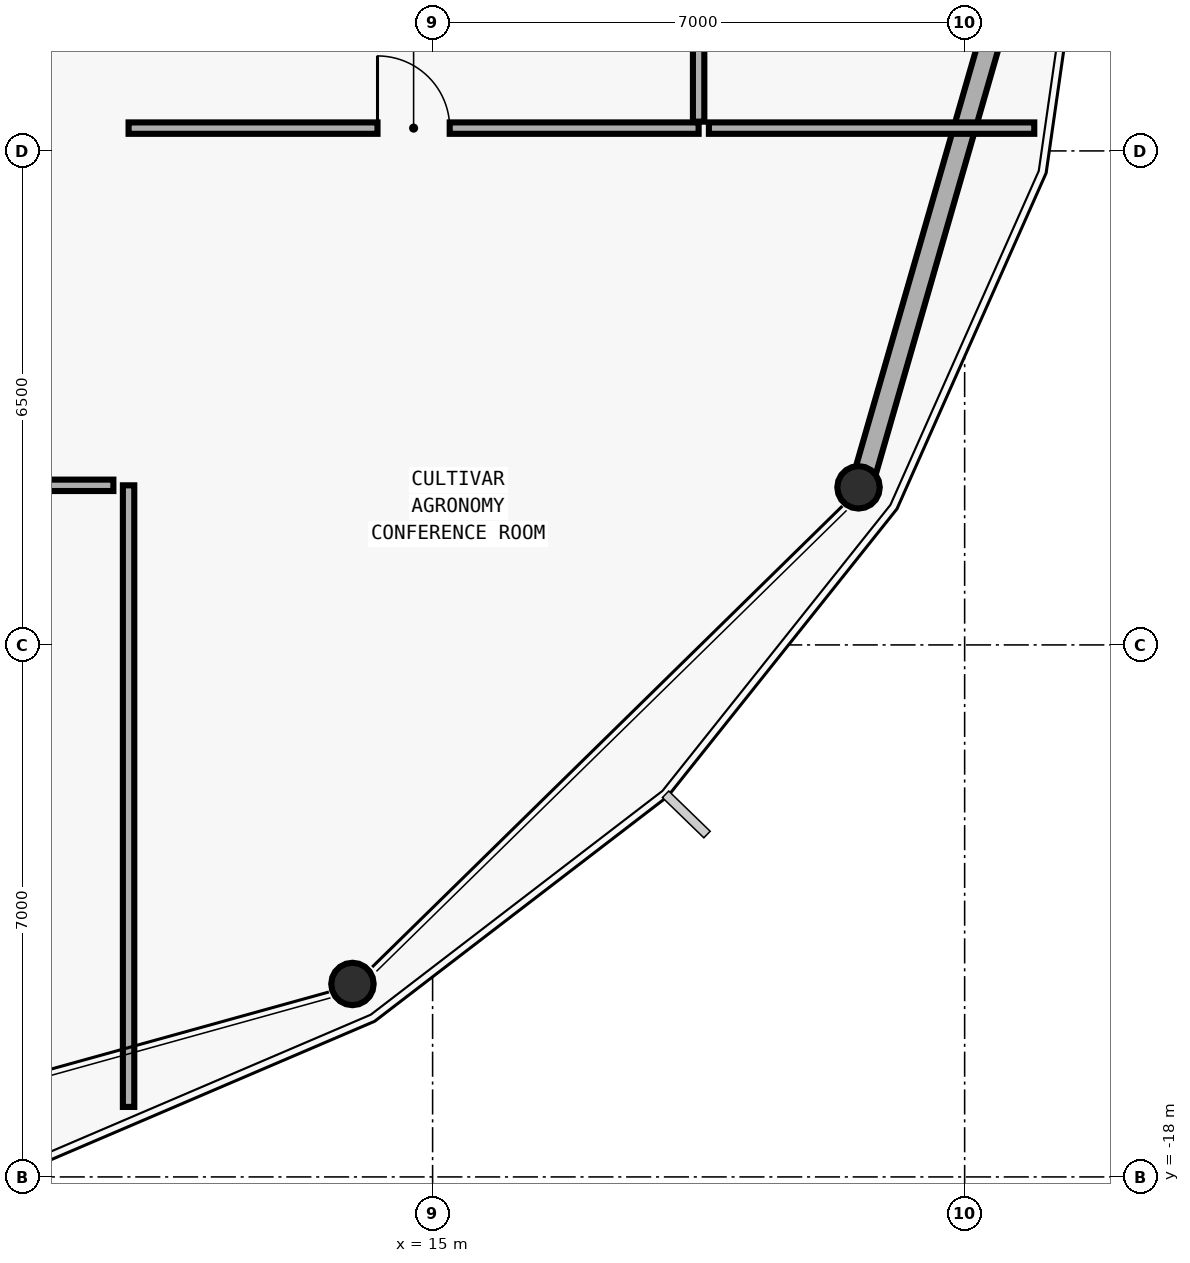
"""IFC4 building model, lengths in metres.
Left out: names, types, materials, properties, quantities, classifications, styles, units other than length and angle.
Written with IfcOpenShell. Run it as: python <this file> out.ifc"""

import sys

from ifc_helpers import new_model, si_unit, direction, frame, frame_2d, origin, origin_2d, place, context, subcontext, project, spatial, rectangle, hollow_circle, extrude, element, fill, save


model = new_model("IFC4")
c1 = context("Model", 3, precision=1e-05, world=origin(), true_north=direction((0.0, 1.0)))
c2 = subcontext(c1, "Body", "Model", "MODEL_VIEW")
j1 = project(units=[si_unit("LENGTHUNIT", "METRE"), si_unit("PLANEANGLEUNIT", "RADIAN")], contexts=[c1])
p1 = place(None, origin())
s1 = spatial("IfcSite", under=j1, at=p1, CompositionType="ELEMENT")
p2 = place(p1, origin())
s2 = spatial("IfcBuilding", under=s1, at=p2, CompositionType="ELEMENT")
p3 = place(p2, frame((0.0, 0.0, 256.2)))
s3 = spatial("IfcBuildingStorey", under=s2, at=p3, CompositionType="ELEMENT", Elevation=256.2)
p4 = place(p3, frame((13.962, -15.476, 0.0), z_axis=(-0.00949183863, 0.008262679671, 0.999920813427), x_axis=(-0.656581650754, -0.754254954172, 0.0)))
e1 = element("IfcColumn", 1, at=p4, inside=s3, PredefinedType="COLUMN", context=c2, shape_type="SweptSolid", body=[
    extrude(hollow_circle(Radius=0.28, WallThickness=0.02, at=origin_2d()), origin(), (0.0, 0.0, 1.0), 3.575),
])
p5 = place(p3, frame((20.633, -8.935, 0.0), z_axis=(-0.016455959383, 0.00477973924, 0.999853166967), x_axis=(-0.278928739366, -0.960311802674, 0.0)))
e2 = element("IfcColumn", 2, at=p5, inside=s3, PredefinedType="COLUMN", context=c2, shape_type="SweptSolid", body=[
    extrude(hollow_circle(Radius=0.28, WallThickness=0.02, at=origin_2d()), origin(), (0.0, 0.0, 1.0), 3.575),
])
p6 = place(p3, frame((23.145, -0.225, 0.0), z_axis=(0.0, 0.0, 1.0), x_axis=(-0.277093893844, -0.960842845628, 0.0)))
e3 = element("IfcWall", 3, at=p6, inside=s3, PredefinedType="SOLIDWALL", context=c2, shape_type="SweptSolid", body=[
    extrude(rectangle(XDim=8.83, YDim=0.28, at=frame_2d((4.415, 0.0))), origin(), (0.0, 0.0, 1.0), 2.97),
])
p7 = place(p3, frame((11.0, -4.2, 0.0), z_axis=(0.0, 0.0, 1.0), x_axis=(1.0, 0.0, 0.0)))
e4 = element("IfcWall", 4, at=p7, inside=s3, PredefinedType="PARTITIONING", context=c2, shape_type="SweptSolid", body=[
    extrude(rectangle(XDim=7.5, YDim=0.15, at=frame_2d((3.75, 0.0))), origin(), (0.0, 0.0, 1.0), 3.36),
])
p8 = place(p7, frame((3.275, 0.0, 0.0)))
e5 = element("IfcOpeningElement", 5, at=p8, cuts=e4, PredefinedType="OPENING", context=c2, shape_type="SweptSolid", body=[
    extrude(rectangle(XDim=0.95, YDim=2.1, at=frame_2d((0.475, 1.05))), frame((0.0, 0.085, 0.0), z_axis=(0.0, -1.0, 0.0), x_axis=(1.0, 0.0, 0.0)), (0.0, 0.0, 1.0), 0.17),
])
p9 = place(p3, frame((8.135, -8.9, 0.0), z_axis=(0.0, 0.0, 1.0), x_axis=(1.0, 0.0, 0.0)))
e6 = element("IfcWall", 6, at=p9, inside=s3, PredefinedType="PARTITIONING", context=c2, shape_type="SweptSolid", body=[
    extrude(rectangle(XDim=2.665, YDim=0.15, at=frame_2d((1.333, 0.0))), origin(), (0.0, 0.0, 1.0), 3.36),
])
p10 = place(p3, frame((11.0, -8.9, 0.0), z_axis=(0.0, 0.0, 1.0), x_axis=(0.0, -1.0, 0.0)))
e7 = element("IfcWall", 7, at=p10, inside=s3, PredefinedType="PARTITIONING", context=c2, shape_type="SweptSolid", body=[
    extrude(rectangle(XDim=8.179, YDim=0.15, at=frame_2d((4.09, 0.0))), origin(), (0.0, 0.0, 1.0), 3.36),
])
p11 = place(p3, frame((18.635, -4.2, 0.0), z_axis=(0.0, 0.0, 1.0), x_axis=(1.0, 0.0, 0.0)))
e8 = element("IfcWall", 8, at=p11, inside=s3, PredefinedType="PARTITIONING", context=c2, shape_type="SweptSolid", body=[
    extrude(rectangle(XDim=4.281, YDim=0.15, at=frame_2d((2.141, 0.0))), origin(), (0.0, 0.0, 1.0), 3.36),
])
p12 = place(p3, frame((18.5, -4.115, 0.0), z_axis=(0.0, 0.0, 1.0), x_axis=(0.0, 1.0, 0.0)))
e9 = element("IfcWall", 9, at=p12, inside=s3, PredefinedType="PARTITIONING", context=c2, shape_type="SweptSolid", body=[
    extrude(rectangle(XDim=2.315, YDim=0.15, at=frame_2d((1.157, 0.0))), origin(), (0.0, 0.0, 1.0), 3.36),
])
p13 = place(p8, origin())
e10 = element("IfcDoor", 10, at=p13, inside=s3, OperationType="SINGLE_SWING_LEFT", PredefinedType="DOOR", context=c2, shape_type="SweptSolid", body=[
    extrude(rectangle(XDim=0.95, YDim=2.1, at=frame_2d((0.475, 1.05))), frame((0.0, 0.025, 0.0), z_axis=(0.0, -1.0, 0.0), x_axis=(1.0, 0.0, 0.0)), (0.0, 0.0, 1.0), 0.05),
])
fill(e5, e10)
save(model, sys.argv[1])
